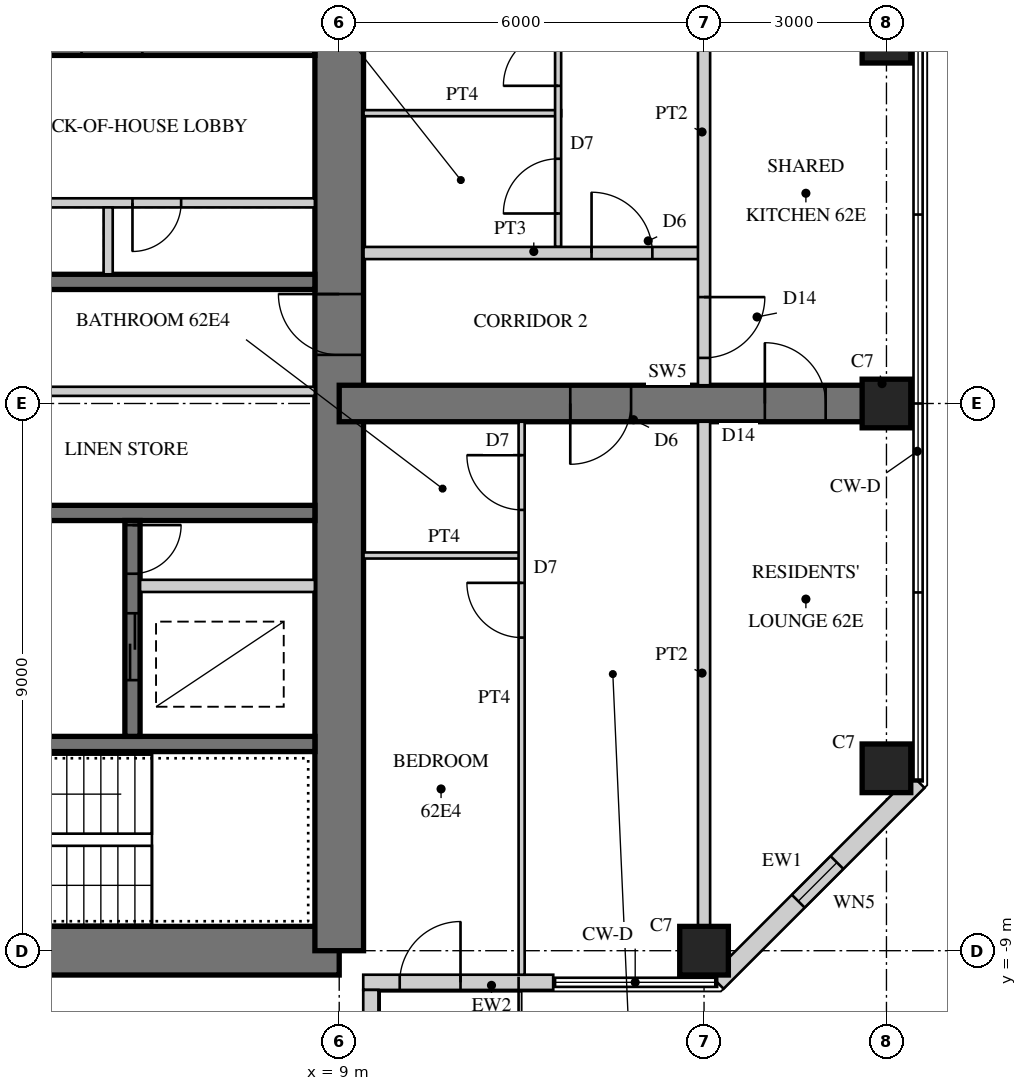
"""IFC4 building model, lengths in metres.
Left out: names, types, materials, properties, quantities, classifications, styles, units other than length and angle.
Written with IfcOpenShell. Run it as: python <this file> out.ifc"""

import sys

from ifc_helpers import new_model, si_unit, direction, frame, frame_2d, origin, origin_2d, place, context, subcontext, project, spatial, rectangle, hollow_rectangle, extrude, element, fill, save


model = new_model("IFC4")
c1 = context("Model", 3, precision=1e-05, world=origin(), true_north=direction((0.0, 1.0)))
c2 = subcontext(c1, "Body", "Model", "MODEL_VIEW")
j1 = project(units=[si_unit("LENGTHUNIT", "METRE"), si_unit("PLANEANGLEUNIT", "RADIAN")], contexts=[c1])
p1 = place(None, origin())
s1 = spatial("IfcSite", under=j1, at=p1, CompositionType="ELEMENT")
p2 = place(p1, origin())
s2 = spatial("IfcBuilding", under=s1, at=p2, CompositionType="ELEMENT")
p3 = place(p2, frame((0.0, 0.0, 242.5)))
s3 = spatial("IfcBuildingStorey", under=s2, at=p3, CompositionType="ELEMENT", Elevation=242.5)
p4 = place(p3, frame((-9.0, -9.0, 0.0), z_axis=(0.0, 0.0, 1.0), x_axis=(1.0, 0.0, 0.0)))
e1 = element("IfcWall", 1, at=p4, inside=s3, PredefinedType="SHEAR", context=c2, shape_type="SweptSolid", body=[
    extrude(rectangle(XDim=18.0, YDim=0.8, at=frame_2d((9.0, 0.0))), origin(), (0.0, 0.0, 1.0), 3.4),
])
p5 = place(p4, frame((9.8, 0.0, 0.0)))
e2 = element("IfcOpeningElement", 2, at=p5, cuts=e1, PredefinedType="OPENING", context=c2, shape_type="SweptSolid", body=[
    extrude(rectangle(XDim=1.0, YDim=2.4, at=frame_2d((0.5, 1.2))), frame((0.0, 0.41, 0.0), z_axis=(0.0, -1.0, 0.0), x_axis=(1.0, 0.0, 0.0)), (0.0, 0.0, 1.0), 0.82),
])
p6 = place(p3, frame((9.0, -9.0, 0.0), z_axis=(0.0, 0.0, 1.0), x_axis=(0.0, 1.0, 0.0)))
e3 = element("IfcWall", 3, at=p6, inside=s3, PredefinedType="SHEAR", context=c2, shape_type="SweptSolid", body=[
    extrude(rectangle(XDim=18.0, YDim=0.8, at=frame_2d((9.0, 0.0))), origin(), (0.0, 0.0, 1.0), 3.4),
])
p7 = place(p6, frame((9.8, 0.0, 0.0)))
e4 = element("IfcOpeningElement", 4, at=p7, cuts=e3, PredefinedType="OPENING", context=c2, shape_type="SweptSolid", body=[
    extrude(rectangle(XDim=1.0, YDim=2.4, at=frame_2d((0.5, 1.2))), frame((0.0, 0.41, 0.0), z_axis=(0.0, -1.0, 0.0), x_axis=(1.0, 0.0, 0.0)), (0.0, 0.0, 1.0), 0.82),
])
p8 = place(p3, frame((1.925, 2.0, 0.0), z_axis=(0.0, 0.0, 1.0), x_axis=(1.0, 0.0, 0.0)))
e5 = element("IfcWall", 5, at=p8, inside=s3, PredefinedType="SHEAR", context=c2, shape_type="SweptSolid", body=[
    extrude(rectangle(XDim=6.675, YDim=0.25, at=frame_2d((3.337, 0.0))), origin(), (0.0, 0.0, 1.0), 3.4),
])
p9 = place(p3, frame((1.925, 5.85, 0.0), z_axis=(0.0, 0.0, 1.0), x_axis=(1.0, 0.0, 0.0)))
e6 = element("IfcWall", 6, at=p9, inside=s3, PredefinedType="SHEAR", context=c2, shape_type="SweptSolid", body=[
    extrude(rectangle(XDim=6.675, YDim=0.25, at=frame_2d((3.337, 0.0))), origin(), (0.0, 0.0, 1.0), 3.4),
])
p10 = place(p9, frame((0.546, 0.0, 0.0)))
e7 = element("IfcOpeningElement", 7, at=p10, cuts=e6, PredefinedType="OPENING", context=c2, shape_type="SweptSolid", body=[
    extrude(rectangle(XDim=1.0, YDim=2.1, at=frame_2d((0.5, 1.05))), frame((0.0, 0.135, 0.0), z_axis=(0.0, -1.0, 0.0), x_axis=(1.0, 0.0, 0.0)), (0.0, 0.0, 1.0), 0.27),
])
p11 = place(p9, frame((2.837, 0.0, 0.0)))
e8 = element("IfcOpeningElement", 8, at=p11, cuts=e6, PredefinedType="OPENING", context=c2, shape_type="SweptSolid", body=[
    extrude(rectangle(XDim=1.0, YDim=2.1, at=frame_2d((0.5, 1.05))), frame((0.0, 0.135, 0.0), z_axis=(0.0, -1.0, 0.0), x_axis=(1.0, 0.0, 0.0)), (0.0, 0.0, 1.0), 0.27),
])
p12 = place(p3, frame((1.925, 3.3, 0.0), z_axis=(0.0, 0.0, 1.0), x_axis=(1.0, 0.0, 0.0)))
e9 = element("IfcWall", 9, at=p12, inside=s3, PredefinedType="PARTITIONING", context=c2, shape_type="SweptSolid", body=[
    extrude(rectangle(XDim=6.675, YDim=0.15, at=frame_2d((3.337, 0.0))), origin(), (0.0, 0.0, 1.0), 3.4),
])
p13 = place(p12, frame((0.075, 0.0, 0.0)))
e10 = element("IfcOpeningElement", 10, at=p13, cuts=e9, PredefinedType="OPENING", context=c2, shape_type="SweptSolid", body=[
    extrude(rectangle(XDim=0.8, YDim=2.1, at=frame_2d((0.4, 1.05))), frame((0.0, 0.085, 0.0), z_axis=(0.0, -1.0, 0.0), x_axis=(1.0, 0.0, 0.0)), (0.0, 0.0, 1.0), 0.17),
])
p14 = place(p12, frame((3.675, 0.0, 0.0)))
e11 = element("IfcOpeningElement", 11, at=p14, cuts=e9, PredefinedType="OPENING", context=c2, shape_type="SweptSolid", body=[
    extrude(rectangle(XDim=0.8, YDim=2.1, at=frame_2d((0.4, 1.05))), frame((0.0, 0.085, 0.0), z_axis=(0.0, -1.0, 0.0), x_axis=(1.0, 0.0, 0.0)), (0.0, 0.0, 1.0), 0.17),
])
p15 = place(p3, frame((5.2, 2.125, 0.0), z_axis=(0.0, 0.0, 1.0), x_axis=(0.0, 1.0, 0.0)))
e12 = element("IfcWall", 12, at=p15, inside=s3, PredefinedType="PARTITIONING", context=c2, shape_type="SweptSolid", body=[
    extrude(rectangle(XDim=1.1, YDim=0.15, at=frame_2d((0.55, 0.0))), origin(), (0.0, 0.0, 1.0), 3.4),
])
p16 = place(p3, frame((2.125, -1.8, 0.0), z_axis=(0.0, 0.0, 1.0), x_axis=(1.0, 0.0, 0.0)))
e13 = element("IfcWall", 13, at=p16, inside=s3, PredefinedType="SHEAR", context=c2, shape_type="SweptSolid", body=[
    extrude(rectangle(XDim=6.475, YDim=0.25, at=frame_2d((3.238, 0.0))), origin(), (0.0, 0.0, 1.0), 3.4),
])
p17 = place(p3, frame((2.125, -5.6, 0.0), z_axis=(0.0, 0.0, 1.0), x_axis=(1.0, 0.0, 0.0)))
e14 = element("IfcWall", 14, at=p17, inside=s3, PredefinedType="SHEAR", context=c2, shape_type="SweptSolid", body=[
    extrude(rectangle(XDim=6.475, YDim=0.25, at=frame_2d((3.238, 0.0))), origin(), (0.0, 0.0, 1.0), 3.4),
])
p18 = place(p17, frame((0.175, 0.0, 0.0)))
e15 = element("IfcOpeningElement", 15, at=p18, cuts=e14, PredefinedType="OPENING", context=c2, shape_type="SweptSolid", body=[
    extrude(rectangle(XDim=1.0, YDim=2.1, at=frame_2d((0.5, 1.05))), frame((0.0, 0.135, 0.0), z_axis=(0.0, -1.0, 0.0), x_axis=(1.0, 0.0, 0.0)), (0.0, 0.0, 1.0), 0.27),
])
p19 = place(p3, frame((5.6, -1.925, 0.0), z_axis=(0.0, 0.0, 1.0), x_axis=(0.0, -1.0, 0.0)))
e16 = element("IfcWall", 16, at=p19, inside=s3, PredefinedType="SHEAR", context=c2, shape_type="SweptSolid", body=[
    extrude(rectangle(XDim=3.55, YDim=0.25, at=frame_2d((1.775, 0.0))), origin(), (0.0, 0.0, 1.0), 3.4),
])
p20 = place(p19, frame((1.525, 0.0, 0.0)))
e17 = element("IfcOpeningElement", 17, at=p20, cuts=e16, PredefinedType="OPENING", context=c2, shape_type="SweptSolid", body=[
    extrude(rectangle(XDim=1.1, YDim=2.2, at=frame_2d((0.55, 1.1))), frame((0.0, 0.135, 0.0), z_axis=(0.0, -1.0, 0.0), x_axis=(1.0, 0.0, 0.0)), (0.0, 0.0, 1.0), 0.27),
])
p21 = place(p19, frame((0.075, 0.0, 0.0)))
e18 = element("IfcOpeningElement", 18, at=p21, cuts=e16, PredefinedType="OPENING", context=c2, shape_type="SweptSolid", body=[
    extrude(rectangle(XDim=0.8, YDim=2.1, at=frame_2d((0.4, 1.05))), frame((0.0, 0.135, 0.0), z_axis=(0.0, -1.0, 0.0), x_axis=(1.0, 0.0, 0.0)), (0.0, 0.0, 1.0), 0.27),
])
p22 = place(p3, frame((5.725, -3.0, 0.0), z_axis=(0.0, 0.0, 1.0), x_axis=(1.0, 0.0, 0.0)))
e19 = element("IfcWall", 19, at=p22, inside=s3, PredefinedType="PARTITIONING", context=c2, shape_type="SweptSolid", body=[
    extrude(rectangle(XDim=2.875, YDim=0.2, at=frame_2d((1.438, 0.0))), origin(), (0.0, 0.0, 1.0), 3.4),
])
p23 = place(p3, frame((9.0, 0.0, 0.0), z_axis=(0.0, 0.0, 1.0), x_axis=(1.0, 0.0, 0.0)))
e20 = element("IfcWall", 20, at=p23, inside=s3, PredefinedType="SHEAR", context=c2, shape_type="SweptSolid", body=[
    extrude(rectangle(XDim=9.0, YDim=0.6, at=frame_2d((4.5, 0.0))), origin(), (0.0, 0.0, 1.0), 3.4),
])
p24 = place(p23, frame((3.8, 0.0, 0.0)))
e21 = element("IfcOpeningElement", 21, at=p24, cuts=e20, PredefinedType="OPENING", context=c2, shape_type="SweptSolid", body=[
    extrude(rectangle(XDim=1.0, YDim=2.15, at=frame_2d((0.5, 1.075))), frame((0.0, 0.31, 0.0), z_axis=(0.0, -1.0, 0.0), x_axis=(1.0, 0.0, 0.0)), (0.0, 0.0, 1.0), 0.62),
])
p25 = place(p23, frame((7.0, 0.0, 0.0)))
e22 = element("IfcOpeningElement", 22, at=p25, cuts=e20, PredefinedType="OPENING", context=c2, shape_type="SweptSolid", body=[
    extrude(rectangle(XDim=1.0, YDim=2.2, at=frame_2d((0.5, 1.1))), frame((0.0, 0.31, 0.0), z_axis=(0.0, -1.0, 0.0), x_axis=(1.0, 0.0, 0.0)), (0.0, 0.0, 1.0), 0.62),
])
for number, where, z_axis, x_axis in (
    (23, (15.0, -9.0, 0.0), (0.0, 0.0, 1.0), (1.0, 0.0, 0.0)),
    (24, (18.0, -6.0, 0.0), (0.0, 0.0, 1.0), (1.0, 0.0, 0.0)),
    (25, (18.0, 0.0, 0.0), (0.0, 0.0, 1.0), (1.0, 0.0, 0.0)),
    (26, (18.0, 6.0, 0.0), (0.0, 0.0, 1.0), (1.0, 0.0, 0.0)),
):
    element("IfcColumn", number, at=place(p3, frame(where, z_axis=z_axis, x_axis=x_axis)), inside=s3, PredefinedType="COLUMN", context=c2, shape_type="SweptSolid", body=[
        extrude(rectangle(XDim=0.8, YDim=0.8, at=origin_2d()), origin(), (0.0, 0.0, 1.0), 3.4),
    ])
p26 = place(p3, frame((9.395, -9.52, 0.0), z_axis=(0.0, 0.0, 1.0), x_axis=(1.0, 0.0, 0.0)))
e27 = element("IfcWall", 27, at=p26, inside=s3, PredefinedType="SOLIDWALL", context=c2, shape_type="SweptSolid", body=[
    extrude(rectangle(XDim=3.125, YDim=0.25, at=frame_2d((1.562, 0.0))), origin(), (0.0, 0.0, 1.0), 3.22),
])
p27 = place(p26, frame((0.6, 0.0, 0.0)))
e28 = element("IfcOpeningElement", 28, at=p27, cuts=e27, PredefinedType="OPENING", context=c2, shape_type="SweptSolid", body=[
    extrude(rectangle(XDim=1.0, YDim=2.2, at=frame_2d((0.5, 1.1))), frame((0.0, 0.135, 0.0), z_axis=(0.0, -1.0, 0.0), x_axis=(1.0, 0.0, 0.0)), (0.0, 0.0, 1.0), 0.27),
])
p28 = place(p3, frame((15.215, -9.52, 0.0), z_axis=(0.0, 0.0, 1.0), x_axis=(0.707106781187, 0.707106781187, 0.0)))
e29 = element("IfcWall", 29, at=p28, inside=s3, PredefinedType="SOLIDWALL", context=c2, shape_type="SweptSolid", body=[
    extrude(rectangle(XDim=4.674, YDim=0.3, at=frame_2d((2.337, 0.0))), origin(), (0.0, 0.0, 1.0), 3.22),
])
p29 = place(p28, frame((1.887, 0.0, 0.3)))
e30 = element("IfcOpeningElement", 30, at=p29, cuts=e29, PredefinedType="OPENING", context=c2, shape_type="SweptSolid", body=[
    extrude(rectangle(XDim=0.9, YDim=2.4, at=frame_2d((0.45, 1.2))), frame((0.0, 0.16, 0.0), z_axis=(0.0, -1.0, 0.0), x_axis=(1.0, 0.0, 0.0)), (0.0, 0.0, 1.0), 0.32),
])
p30 = place(p3, frame((9.52, -12.52, 0.0), z_axis=(0.0, 0.0, 1.0), x_axis=(0.0, 1.0, 0.0)))
e31 = element("IfcWall", 31, at=p30, inside=s3, PredefinedType="SOLIDWALL", context=c2, shape_type="SweptSolid", body=[
    extrude(rectangle(XDim=2.875, YDim=0.25, at=frame_2d((1.438, 0.0))), origin(), (0.0, 0.0, 1.0), 3.22),
])
p31 = place(p30, frame((0.6, 0.0, 0.0)))
e32 = element("IfcOpeningElement", 32, at=p31, cuts=e31, PredefinedType="OPENING", context=c2, shape_type="SweptSolid", body=[
    extrude(rectangle(XDim=1.0, YDim=2.2, at=frame_2d((0.5, 1.1))), frame((0.0, 0.135, 0.0), z_axis=(0.0, -1.0, 0.0), x_axis=(1.0, 0.0, 0.0)), (0.0, 0.0, 1.0), 0.27),
])
p32 = place(p3, frame((2.325, 0.2, 0.0), z_axis=(0.0, 0.0, 1.0), x_axis=(1.0, 0.0, 0.0)))
e33 = element("IfcWall", 33, at=p32, inside=s3, PredefinedType="PARTITIONING", context=c2, shape_type="SweptSolid", body=[
    extrude(rectangle(XDim=6.275, YDim=0.15, at=frame_2d((3.138, 0.0))), origin(), (0.0, 0.0, 1.0), 3.22),
])
p33 = place(p32, frame((0.4, 0.0, 0.0)))
e34 = element("IfcOpeningElement", 34, at=p33, cuts=e33, PredefinedType="OPENING", context=c2, shape_type="SweptSolid", body=[
    extrude(rectangle(XDim=1.0, YDim=2.1, at=frame_2d((0.5, 1.05))), frame((0.0, 0.085, 0.0), z_axis=(0.0, -1.0, 0.0), x_axis=(1.0, 0.0, 0.0)), (0.0, 0.0, 1.0), 0.17),
])
p34 = place(p3, frame((9.4, 4.775, 0.0), z_axis=(0.0, 0.0, 1.0), x_axis=(1.0, 0.0, 0.0)))
e35 = element("IfcWall", 35, at=p34, inside=s3, PredefinedType="PARTITIONING", context=c2, shape_type="SweptSolid", body=[
    extrude(rectangle(XDim=3.25, YDim=0.1, at=frame_2d((1.625, 0.0))), origin(), (0.0, 0.0, 1.0), 3.22),
])
p35 = place(p3, frame((12.6, 2.575, 0.0), z_axis=(0.0, 0.0, 1.0), x_axis=(0.0, 1.0, 0.0)))
e36 = element("IfcWall", 36, at=p35, inside=s3, PredefinedType="PARTITIONING", context=c2, shape_type="SweptSolid", body=[
    extrude(rectangle(XDim=6.905, YDim=0.1, at=frame_2d((3.453, 0.0))), origin(), (0.0, 0.0, 1.0), 3.22),
])
p36 = place(p35, frame((0.55, 0.0, 0.0)))
e37 = element("IfcOpeningElement", 37, at=p36, cuts=e36, PredefinedType="OPENING", context=c2, shape_type="SweptSolid", body=[
    extrude(rectangle(XDim=0.9, YDim=2.1, at=frame_2d((0.45, 1.05))), frame((0.0, 0.06, 0.0), z_axis=(0.0, -1.0, 0.0), x_axis=(1.0, 0.0, 0.0)), (0.0, 0.0, 1.0), 0.12),
])
p37 = place(p35, frame((2.65, 0.0, 0.0)))
e38 = element("IfcOpeningElement", 38, at=p37, cuts=e36, PredefinedType="OPENING", context=c2, shape_type="SweptSolid", body=[
    extrude(rectangle(XDim=0.9, YDim=2.1, at=frame_2d((0.45, 1.05))), frame((0.0, 0.06, 0.0), z_axis=(0.0, -1.0, 0.0), x_axis=(1.0, 0.0, 0.0)), (0.0, 0.0, 1.0), 0.12),
])
p38 = place(p3, frame((9.4, -2.5, 0.0), z_axis=(0.0, 0.0, 1.0), x_axis=(1.0, 0.0, 0.0)))
e39 = element("IfcWall", 39, at=p38, inside=s3, PredefinedType="PARTITIONING", context=c2, shape_type="SweptSolid", body=[
    extrude(rectangle(XDim=2.65, YDim=0.1, at=frame_2d((1.325, 0.0))), origin(), (0.0, 0.0, 1.0), 3.22),
])
p39 = place(p3, frame((12.0, -9.395, 0.0), z_axis=(0.0, 0.0, 1.0), x_axis=(0.0, 1.0, 0.0)))
e40 = element("IfcWall", 40, at=p39, inside=s3, PredefinedType="PARTITIONING", context=c2, shape_type="SweptSolid", body=[
    extrude(rectangle(XDim=9.095, YDim=0.1, at=frame_2d((4.547, 0.0))), origin(), (0.0, 0.0, 1.0), 3.22),
])
p40 = place(p39, frame((5.545, 0.0, 0.0)))
e41 = element("IfcOpeningElement", 41, at=p40, cuts=e40, PredefinedType="OPENING", context=c2, shape_type="SweptSolid", body=[
    extrude(rectangle(XDim=0.9, YDim=2.1, at=frame_2d((0.45, 1.05))), frame((0.0, 0.06, 0.0), z_axis=(0.0, -1.0, 0.0), x_axis=(1.0, 0.0, 0.0)), (0.0, 0.0, 1.0), 0.12),
])
p41 = place(p39, frame((7.645, 0.0, 0.0)))
e42 = element("IfcOpeningElement", 42, at=p41, cuts=e40, PredefinedType="OPENING", context=c2, shape_type="SweptSolid", body=[
    extrude(rectangle(XDim=0.9, YDim=2.1, at=frame_2d((0.45, 1.05))), frame((0.0, 0.06, 0.0), z_axis=(0.0, -1.0, 0.0), x_axis=(1.0, 0.0, 0.0)), (0.0, 0.0, 1.0), 0.12),
])
p42 = place(p3, frame((9.4, 2.475, 0.0), z_axis=(0.0, 0.0, 1.0), x_axis=(1.0, 0.0, 0.0)))
e43 = element("IfcWall", 43, at=p42, inside=s3, PredefinedType="SOLIDWALL", context=c2, shape_type="SweptSolid", body=[
    extrude(rectangle(XDim=5.6, YDim=0.2, at=frame_2d((2.8, 0.0))), origin(), (0.0, 0.0, 1.0), 3.22),
])
p43 = place(p42, frame((3.75, 0.0, 0.0)))
e44 = element("IfcOpeningElement", 44, at=p43, cuts=e43, PredefinedType="OPENING", context=c2, shape_type="SweptSolid", body=[
    extrude(rectangle(XDim=1.0, YDim=2.15, at=frame_2d((0.5, 1.075))), frame((0.0, 0.11, 0.0), z_axis=(0.0, -1.0, 0.0), x_axis=(1.0, 0.0, 0.0)), (0.0, 0.0, 1.0), 0.22),
])
p44 = place(p3, frame((15.0, -8.6, 0.0), z_axis=(0.0, 0.0, 1.0), x_axis=(0.0, 1.0, 0.0)))
e45 = element("IfcWall", 45, at=p44, inside=s3, PredefinedType="SOLIDWALL", context=c2, shape_type="SweptSolid", body=[
    extrude(rectangle(XDim=8.3, YDim=0.2, at=frame_2d((4.15, 0.0))), origin(), (0.0, 0.0, 1.0), 2.52),
])
p45 = place(p3, frame((15.0, 0.3, 0.0), z_axis=(0.0, 0.0, 1.0), x_axis=(0.0, 1.0, 0.0)))
e46 = element("IfcWall", 46, at=p45, inside=s3, PredefinedType="SOLIDWALL", context=c2, shape_type="SweptSolid", body=[
    extrude(rectangle(XDim=8.3, YDim=0.2, at=frame_2d((4.15, 0.0))), origin(), (0.0, 0.0, 1.0), 2.52),
])
p46 = place(p45, frame((0.45, 0.0, 0.0)))
e47 = element("IfcOpeningElement", 47, at=p46, cuts=e46, PredefinedType="OPENING", context=c2, shape_type="SweptSolid", body=[
    extrude(rectangle(XDim=1.0, YDim=2.2, at=frame_2d((0.5, 1.1))), frame((0.0, 0.11, 0.0), z_axis=(0.0, -1.0, 0.0), x_axis=(1.0, 0.0, 0.0)), (0.0, 0.0, 1.0), 0.22),
])
p47 = place(p27, origin())
e48 = element("IfcDoor", 48, at=p47, inside=s3, OperationType="SINGLE_SWING_RIGHT", PredefinedType="DOOR", context=c2, shape_type="SweptSolid", body=[
    extrude(hollow_rectangle(XDim=1.0, YDim=2.2, WallThickness=0.06, at=frame_2d((0.5, 1.1))), frame((0.0, 0.025, 0.0), z_axis=(0.0, -1.0, 0.0), x_axis=(1.0, 0.0, 0.0)), (0.0, 0.0, 1.0), 0.05),
    extrude(rectangle(XDim=0.879, YDim=2.079, at=frame_2d((0.5, 1.1))), frame((0.0, 0.025, 0.0), z_axis=(0.0, -1.0, 0.0), x_axis=(1.0, 0.0, 0.0)), (0.0, 0.0, 1.0), 0.05),
])
fill(e28, e48)
p48 = place(p29, origin())
e49 = element("IfcWindow", 49, at=p48, inside=s3, PartitioningType="SINGLE_PANEL", PredefinedType="WINDOW", context=c2, shape_type="SweptSolid", body=[
    extrude(hollow_rectangle(XDim=0.9, YDim=2.4, WallThickness=0.06, at=frame_2d((0.45, 1.2))), frame((0.0, 0.03, 0.0), z_axis=(0.0, -1.0, 0.0), x_axis=(1.0, 0.0, 0.0)), (0.0, 0.0, 1.0), 0.06),
    extrude(rectangle(XDim=0.779, YDim=2.279, at=frame_2d((0.45, 1.2))), frame((0.0, 0.03, 0.0), z_axis=(0.0, -1.0, 0.0), x_axis=(1.0, 0.0, 0.0)), (0.0, 0.0, 1.0), 0.06),
])
fill(e30, e49)
p49 = place(p36, origin())
e50 = element("IfcDoor", 50, at=p49, inside=s3, OperationType="SINGLE_SWING_LEFT", PredefinedType="DOOR", context=c2, shape_type="SweptSolid", body=[
    extrude(rectangle(XDim=0.9, YDim=2.1, at=frame_2d((0.45, 1.05))), frame((0.0, 0.025, 0.0), z_axis=(0.0, -1.0, 0.0), x_axis=(1.0, 0.0, 0.0)), (0.0, 0.0, 1.0), 0.05),
])
fill(e37, e50)
p50 = place(p37, origin())
e51 = element("IfcDoor", 51, at=p50, inside=s3, OperationType="SINGLE_SWING_LEFT", PredefinedType="DOOR", context=c2, shape_type="SweptSolid", body=[
    extrude(rectangle(XDim=0.9, YDim=2.1, at=frame_2d((0.45, 1.05))), frame((0.0, 0.025, 0.0), z_axis=(0.0, -1.0, 0.0), x_axis=(1.0, 0.0, 0.0)), (0.0, 0.0, 1.0), 0.05),
])
fill(e38, e51)
p51 = place(p40, origin())
e52 = element("IfcDoor", 52, at=p51, inside=s3, OperationType="SINGLE_SWING_RIGHT", PredefinedType="DOOR", context=c2, shape_type="SweptSolid", body=[
    extrude(rectangle(XDim=0.9, YDim=2.1, at=frame_2d((0.45, 1.05))), frame((0.0, 0.025, 0.0), z_axis=(0.0, -1.0, 0.0), x_axis=(1.0, 0.0, 0.0)), (0.0, 0.0, 1.0), 0.05),
])
fill(e41, e52)
p52 = place(p41, origin())
e53 = element("IfcDoor", 53, at=p52, inside=s3, OperationType="SINGLE_SWING_RIGHT", PredefinedType="DOOR", context=c2, shape_type="SweptSolid", body=[
    extrude(rectangle(XDim=0.9, YDim=2.1, at=frame_2d((0.45, 1.05))), frame((0.0, 0.025, 0.0), z_axis=(0.0, -1.0, 0.0), x_axis=(1.0, 0.0, 0.0)), (0.0, 0.0, 1.0), 0.05),
])
fill(e42, e53)
p53 = place(p43, origin())
e54 = element("IfcDoor", 54, at=p53, inside=s3, OperationType="SINGLE_SWING_LEFT", PredefinedType="DOOR", context=c2, shape_type="SweptSolid", body=[
    extrude(rectangle(XDim=1.0, YDim=2.15, at=frame_2d((0.5, 1.075))), frame((0.0, 0.025, 0.0), z_axis=(0.0, -1.0, 0.0), x_axis=(1.0, 0.0, 0.0)), (0.0, 0.0, 1.0), 0.05),
])
fill(e44, e54)
p54 = place(p46, frame((1.0, 0.0, 0.0), z_axis=(0.0, 0.0, 1.0), x_axis=(-1.0, 0.0, 0.0)))
e55 = element("IfcDoor", 55, at=p54, inside=s3, OperationType="SINGLE_SWING_LEFT", PredefinedType="DOOR", context=c2, shape_type="SweptSolid", body=[
    extrude(rectangle(XDim=1.0, YDim=2.2, at=frame_2d((0.5, 1.1))), frame((0.0, 0.025, 0.0), z_axis=(0.0, -1.0, 0.0), x_axis=(1.0, 0.0, 0.0)), (0.0, 0.0, 1.0), 0.05),
])
fill(e47, e55)
p55 = place(p24, frame((1.0, 0.0, 0.0), z_axis=(0.0, 0.0, 1.0), x_axis=(-1.0, 0.0, 0.0)))
e56 = element("IfcDoor", 56, at=p55, inside=s3, OperationType="SINGLE_SWING_RIGHT", PredefinedType="DOOR", context=c2, shape_type="SweptSolid", body=[
    extrude(rectangle(XDim=1.0, YDim=2.15, at=frame_2d((0.5, 1.075))), frame((0.0, 0.025, 0.0), z_axis=(0.0, -1.0, 0.0), x_axis=(1.0, 0.0, 0.0)), (0.0, 0.0, 1.0), 0.05),
])
fill(e21, e56)
p56 = place(p25, origin())
e57 = element("IfcDoor", 57, at=p56, inside=s3, OperationType="SINGLE_SWING_LEFT", PredefinedType="DOOR", context=c2, shape_type="SweptSolid", body=[
    extrude(rectangle(XDim=1.0, YDim=2.2, at=frame_2d((0.5, 1.1))), frame((0.0, 0.025, 0.0), z_axis=(0.0, -1.0, 0.0), x_axis=(1.0, 0.0, 0.0)), (0.0, 0.0, 1.0), 0.05),
])
fill(e22, e57)
p57 = place(p7, origin())
e58 = element("IfcDoor", 58, at=p57, inside=s3, OperationType="SINGLE_SWING_RIGHT", PredefinedType="DOOR", context=c2, shape_type="SweptSolid", body=[
    extrude(rectangle(XDim=1.0, YDim=2.4, at=frame_2d((0.5, 1.2))), frame((0.0, 0.055, 0.0), z_axis=(0.0, -1.0, 0.0), x_axis=(1.0, 0.0, 0.0)), (0.0, 0.0, 1.0), 0.05),
])
fill(e4, e58)
p58 = place(p14, frame((0.8, 0.0, 0.0), z_axis=(0.0, 0.0, 1.0), x_axis=(-1.0, 0.0, 0.0)))
e59 = element("IfcDoor", 59, at=p58, inside=s3, OperationType="SINGLE_SWING_RIGHT", PredefinedType="DOOR", context=c2, shape_type="SweptSolid", body=[
    extrude(rectangle(XDim=0.8, YDim=2.1, at=frame_2d((0.4, 1.05))), frame((0.0, 0.025, 0.0), z_axis=(0.0, -1.0, 0.0), x_axis=(1.0, 0.0, 0.0)), (0.0, 0.0, 1.0), 0.05),
])
fill(e11, e59)
p59 = place(p20, origin())
e60 = element("IfcDoor", 60, at=p59, inside=s3, OperationType="DOUBLE_DOOR_SLIDING", PredefinedType="DOOR", context=c2, shape_type="SweptSolid", body=[
    extrude(rectangle(XDim=1.1, YDim=2.2, at=frame_2d((0.55, 1.1))), frame((0.0, 0.025, 0.0), z_axis=(0.0, -1.0, 0.0), x_axis=(1.0, 0.0, 0.0)), (0.0, 0.0, 1.0), 0.05),
])
fill(e17, e60)
p60 = place(p21, origin())
e61 = element("IfcDoor", 61, at=p60, inside=s3, OperationType="SINGLE_SWING_LEFT", PredefinedType="DOOR", context=c2, shape_type="SweptSolid", body=[
    extrude(rectangle(XDim=0.8, YDim=2.1, at=frame_2d((0.4, 1.05))), frame((0.0, 0.025, 0.0), z_axis=(0.0, -1.0, 0.0), x_axis=(1.0, 0.0, 0.0)), (0.0, 0.0, 1.0), 0.05),
])
fill(e18, e61)
save(model, sys.argv[1])
